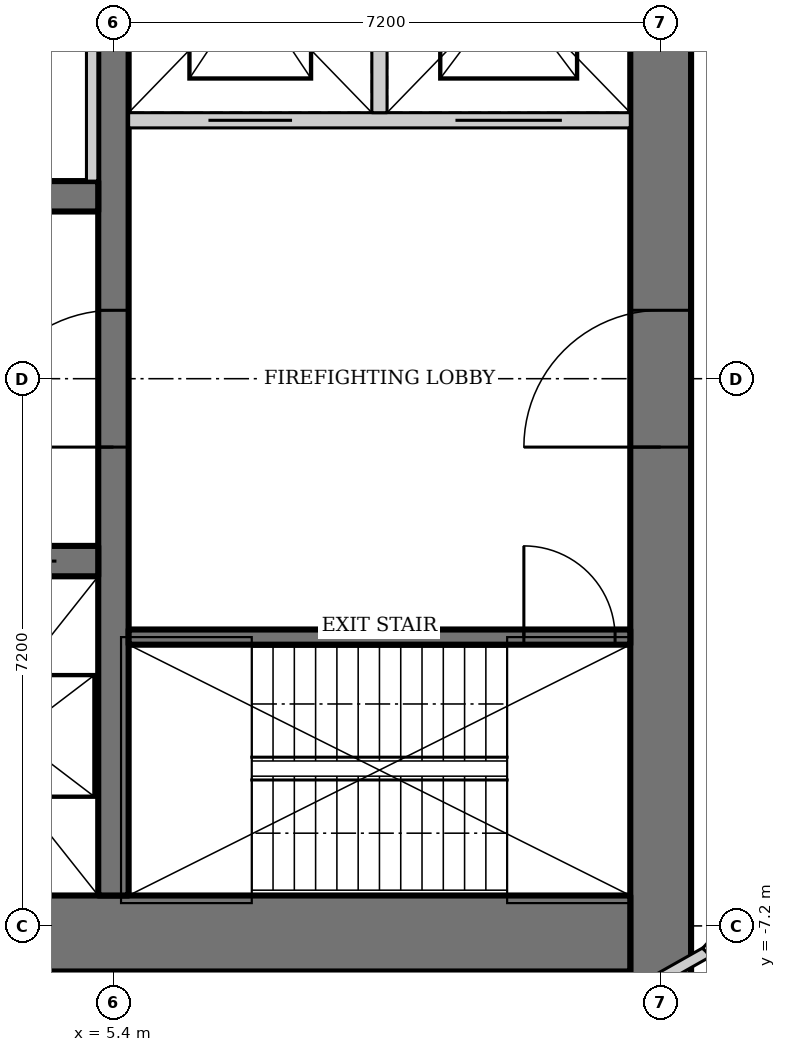
"""IFC4 building model, lengths in metres.
Left out: names, types, materials, properties, quantities, classifications, styles, units other than length and angle.
Written with IfcOpenShell. Run it as: python <this file> out.ifc"""

import sys

from ifc_helpers import new_model, si_unit, direction, frame, frame_2d, origin, place, context, subcontext, project, spatial, rectangle, extrude, element, fill, save


model = new_model("IFC4")
c1 = context("Model", 3, precision=1e-05, world=origin(), true_north=direction((0.0, 1.0)))
c2 = subcontext(c1, "Body", "Model", "MODEL_VIEW")
j1 = project(units=[si_unit("LENGTHUNIT", "METRE"), si_unit("PLANEANGLEUNIT", "RADIAN")], contexts=[c1])
p1 = place(None, origin())
s1 = spatial("IfcSite", under=j1, at=p1, CompositionType="ELEMENT")
p2 = place(p1, origin())
s2 = spatial("IfcBuilding", under=s1, at=p2, CompositionType="ELEMENT")
p3 = place(p2, frame((0.0, 0.0, 270.4)))
s3 = spatial("IfcBuildingStorey", under=s2, at=p3, CompositionType="ELEMENT", Elevation=270.4)
p4 = place(p3, frame((12.6, -11.0, 0.0), z_axis=(0.0, 0.0, 1.0), x_axis=(0.0, 1.0, 0.0)))
e1 = element("IfcWall", 1, at=p4, inside=s3, PredefinedType="SHEAR", context=c2, shape_type="SweptSolid", body=[
    extrude(rectangle(XDim=22.0, YDim=0.8, at=frame_2d((11.0, 0.0))), origin(), (0.0, 0.0, 1.0), 4.5),
])
p5 = place(p4, frame((10.1, 0.0, 0.0)))
e2 = element("IfcOpeningElement", 2, at=p5, cuts=e1, PredefinedType="OPENING", context=c2, shape_type="SweptSolid", body=[
    extrude(rectangle(XDim=1.8, YDim=2.1, at=frame_2d((0.9, 1.05))), frame((0.0, 0.41, 0.0), z_axis=(0.0, -1.0, 0.0), x_axis=(1.0, 0.0, 0.0)), (0.0, 0.0, 1.0), 0.82),
])
p6 = place(p3, frame((-12.2, -7.3, 0.0), z_axis=(0.0, 0.0, 1.0), x_axis=(1.0, 0.0, 0.0)))
e3 = element("IfcWall", 3, at=p6, inside=s3, PredefinedType="SHEAR", context=c2, shape_type="SweptSolid", body=[
    extrude(rectangle(XDim=24.4, YDim=1.0, at=frame_2d((12.2, 0.0))), origin(), (0.0, 0.0, 1.0), 4.5),
])
p7 = place(p3, frame((5.4, -6.8, 0.0), z_axis=(0.0, 0.0, 1.0), x_axis=(0.0, 1.0, 0.0)))
e4 = element("IfcWall", 4, at=p7, inside=s3, PredefinedType="SHEAR", context=c2, shape_type="SweptSolid", body=[
    extrude(rectangle(XDim=14.6, YDim=0.4, at=frame_2d((7.3, 0.0))), origin(), (0.0, 0.0, 1.0), 4.5),
])
p8 = place(p7, frame((5.9, 0.0, 0.0)))
e5 = element("IfcOpeningElement", 5, at=p8, cuts=e4, PredefinedType="OPENING", context=c2, shape_type="SweptSolid", body=[
    extrude(rectangle(XDim=1.8, YDim=2.1, at=frame_2d((0.9, 1.05))), frame((0.0, 0.21, 0.0), z_axis=(0.0, -1.0, 0.0), x_axis=(1.0, 0.0, 0.0)), (0.0, 0.0, 1.0), 0.42),
])
p9 = place(p3, frame((-5.2, -2.4, 0.0), z_axis=(0.0, 0.0, 1.0), x_axis=(1.0, 0.0, 0.0)))
e6 = element("IfcWall", 6, at=p9, inside=s3, PredefinedType="SHEAR", context=c2, shape_type="SweptSolid", body=[
    extrude(rectangle(XDim=10.4, YDim=0.4, at=frame_2d((5.2, 0.0))), origin(), (0.0, 0.0, 1.0), 4.5),
])
p10 = place(p9, frame((1.683, 0.0, 0.0)))
e7 = element("IfcOpeningElement", 7, at=p10, cuts=e6, PredefinedType="OPENING", context=c2, shape_type="SweptSolid", body=[
    extrude(rectangle(XDim=1.1, YDim=2.2, at=frame_2d((0.55, 1.1))), frame((0.0, 0.21, 0.0), z_axis=(0.0, -1.0, 0.0), x_axis=(1.0, 0.0, 0.0)), (0.0, 0.0, 1.0), 0.42),
])
p11 = place(p9, frame((5.217, 0.0, 0.0)))
e8 = element("IfcOpeningElement", 8, at=p11, cuts=e6, PredefinedType="OPENING", context=c2, shape_type="SweptSolid", body=[
    extrude(rectangle(XDim=1.1, YDim=2.2, at=frame_2d((0.55, 1.1))), frame((0.0, 0.21, 0.0), z_axis=(0.0, -1.0, 0.0), x_axis=(1.0, 0.0, 0.0)), (0.0, 0.0, 1.0), 0.42),
])
p12 = place(p9, frame((8.75, 0.0, 0.0)))
e9 = element("IfcOpeningElement", 9, at=p12, cuts=e6, PredefinedType="OPENING", context=c2, shape_type="SweptSolid", body=[
    extrude(rectangle(XDim=1.1, YDim=2.2, at=frame_2d((0.55, 1.1))), frame((0.0, 0.21, 0.0), z_axis=(0.0, -1.0, 0.0), x_axis=(1.0, 0.0, 0.0)), (0.0, 0.0, 1.0), 0.42),
])
p13 = place(p3, frame((5.2, 2.4, 0.0), z_axis=(0.0, 0.0, 1.0), x_axis=(-1.0, 0.0, 0.0)))
e10 = element("IfcWall", 10, at=p13, inside=s3, PredefinedType="SHEAR", context=c2, shape_type="SweptSolid", body=[
    extrude(rectangle(XDim=10.4, YDim=0.4, at=frame_2d((5.2, 0.0))), origin(), (0.0, 0.0, 1.0), 4.5),
])
p14 = place(p3, frame((5.6, -3.4, 0.0), z_axis=(0.0, 0.0, 1.0), x_axis=(1.0, 0.0, 0.0)))
e11 = element("IfcWall", 11, at=p14, inside=s3, PredefinedType="SHEAR", context=c2, shape_type="SweptSolid", body=[
    extrude(rectangle(XDim=6.6, YDim=0.2, at=frame_2d((3.3, 0.0))), origin(), (0.0, 0.0, 1.0), 4.5),
])
p15 = place(p14, frame((5.2, 0.0, 0.0)))
e12 = element("IfcOpeningElement", 12, at=p15, cuts=e11, PredefinedType="OPENING", context=c2, shape_type="SweptSolid", body=[
    extrude(rectangle(XDim=1.2, YDim=2.1, at=frame_2d((0.6, 1.05))), frame((0.0, 0.11, 0.0), z_axis=(0.0, -1.0, 0.0), x_axis=(1.0, 0.0, 0.0)), (0.0, 0.0, 1.0), 0.22),
])
p16 = place(p3, frame((12.2, 3.4, 0.0), z_axis=(0.0, 0.0, 1.0), x_axis=(-1.0, 0.0, 0.0)))
e13 = element("IfcWall", 13, at=p16, inside=s3, PredefinedType="SOLIDWALL", context=c2, shape_type="SweptSolid", body=[
    extrude(rectangle(XDim=6.6, YDim=0.2, at=frame_2d((3.3, 0.0))), origin(), (0.0, 0.0, 1.0), 4.5),
])
p17 = place(p16, frame((4.45, 0.0, 0.0)))
e14 = element("IfcOpeningElement", 14, at=p17, cuts=e13, PredefinedType="OPENING", context=c2, shape_type="SweptSolid", body=[
    extrude(rectangle(XDim=1.1, YDim=2.2, at=frame_2d((0.55, 1.1))), frame((0.0, 0.11, 0.0), z_axis=(0.0, -1.0, 0.0), x_axis=(1.0, 0.0, 0.0)), (0.0, 0.0, 1.0), 0.22),
])
p18 = place(p16, frame((0.9, 0.0, 0.0)))
e15 = element("IfcOpeningElement", 15, at=p18, cuts=e13, PredefinedType="OPENING", context=c2, shape_type="SweptSolid", body=[
    extrude(rectangle(XDim=1.4, YDim=2.2, at=frame_2d((0.7, 1.1))), frame((0.0, 0.11, 0.0), z_axis=(0.0, -1.0, 0.0), x_axis=(1.0, 0.0, 0.0)), (0.0, 0.0, 1.0), 0.22),
])
p19 = place(p3, frame((8.9, 3.5, 0.0), z_axis=(0.0, 0.0, 1.0), x_axis=(0.0, 1.0, 0.0)))
e16 = element("IfcWall", 16, at=p19, inside=s3, PredefinedType="SOLIDWALL", context=c2, shape_type="SweptSolid", body=[
    extrude(rectangle(XDim=3.3, YDim=0.2, at=frame_2d((1.65, 0.0))), origin(), (0.0, 0.0, 1.0), 4.5),
])
p20 = place(p3, frame((19.959, -11.355, 0.0), z_axis=(0.0, 0.0, 1.0), x_axis=(-0.871035125561, 0.491220734537, 0.0)))
e17 = element("IfcWall", 17, at=p20, inside=s3, PredefinedType="PARTITIONING", context=c2, shape_type="SweptSolid", body=[
    extrude(rectangle(XDim=7.753, YDim=0.1, at=frame_2d((3.877, 0.0))), origin(), (0.0, 0.0, 1.0), 3.824),
])
p21 = place(p3, frame((16.362, 4.08, 0.0), z_axis=(0.0, 0.0, 1.0), x_axis=(-0.67323765707, 0.739426167445, 0.0)))
e18 = element("IfcWall", 18, at=p21, inside=s3, PredefinedType="PARTITIONING", context=c2, shape_type="SweptSolid", body=[
    extrude(rectangle(XDim=4.688, YDim=0.15, at=frame_2d((2.344, 0.0))), origin(), (0.0, 0.0, 1.0), 4.35),
])
p22 = place(p21, frame((0.15, 0.0, 0.0)))
e19 = element("IfcOpeningElement", 19, at=p22, cuts=e18, PredefinedType="OPENING", context=c2, shape_type="SweptSolid", body=[
    extrude(rectangle(XDim=0.9, YDim=2.1, at=frame_2d((0.45, 1.05))), frame((0.0, 0.085, 0.0), z_axis=(0.0, -1.0, 0.0), x_axis=(1.0, 0.0, 0.0)), (0.0, 0.0, 1.0), 0.17),
])
p23 = place(p3, frame((9.377, -9.71, 0.0), z_axis=(0.0, 0.0, 1.0), x_axis=(0.870593853694, 0.492002379984, 0.0)))
e20 = element("IfcWall", 20, at=p23, inside=s3, PredefinedType="PARTITIONING", context=c2, shape_type="SweptSolid", body=[
    extrude(rectangle(XDim=4.398, YDim=0.15, at=frame_2d((2.199, 0.0))), origin(), (0.0, 0.0, 1.0), 4.35),
])
p24 = place(p23, frame((0.15, 0.0, 0.0)))
e21 = element("IfcOpeningElement", 21, at=p24, cuts=e20, PredefinedType="OPENING", context=c2, shape_type="SweptSolid", body=[
    extrude(rectangle(XDim=0.9, YDim=2.1, at=frame_2d((0.45, 1.05))), frame((0.0, 0.085, 0.0), z_axis=(0.0, -1.0, 0.0), x_axis=(1.0, 0.0, 0.0)), (0.0, 0.0, 1.0), 0.17),
])
p25 = place(p3, frame((13.206, -7.546, 0.0), z_axis=(0.0, 0.0, 1.0), x_axis=(0.67323765707, 0.739426167445, 0.0)))
e22 = element("IfcWall", 22, at=p25, inside=s3, PredefinedType="PARTITIONING", context=c2, shape_type="SweptSolid", body=[
    extrude(rectangle(XDim=4.688, YDim=0.15, at=frame_2d((2.344, 0.0))), origin(), (0.0, 0.0, 1.0), 4.35),
])
p26 = place(p25, frame((3.638, 0.0, 0.0)))
e23 = element("IfcOpeningElement", 23, at=p26, cuts=e22, PredefinedType="OPENING", context=c2, shape_type="SweptSolid", body=[
    extrude(rectangle(XDim=0.9, YDim=2.1, at=frame_2d((0.45, 1.05))), frame((0.0, 0.085, 0.0), z_axis=(0.0, -1.0, 0.0), x_axis=(1.0, 0.0, 0.0)), (0.0, 0.0, 1.0), 0.17),
])
p27 = place(p3, frame((5.12, 2.6, 0.0), z_axis=(0.0, 0.0, 1.0), x_axis=(0.0, 1.0, 0.0)))
e24 = element("IfcWall", 24, at=p27, inside=s3, PredefinedType="SOLIDWALL", context=c2, shape_type="SweptSolid", body=[
    extrude(rectangle(XDim=4.4, YDim=0.15, at=frame_2d((2.2, 0.0))), origin(), (0.0, 0.0, 1.0), 4.35),
])
p28 = place(p8, origin())
e25 = element("IfcDoor", 25, at=p28, inside=s3, OperationType="DOUBLE_DOOR_DOUBLE_SWING", PredefinedType="DOOR", context=c2, shape_type="SweptSolid", body=[
    extrude(rectangle(XDim=1.8, YDim=2.1, at=frame_2d((0.9, 1.05))), frame((0.0, 0.025, 0.0), z_axis=(0.0, -1.0, 0.0), x_axis=(1.0, 0.0, 0.0)), (0.0, 0.0, 1.0), 0.05),
])
fill(e5, e25)
p29 = place(p15, origin())
e26 = element("IfcDoor", 26, at=p29, inside=s3, OperationType="SINGLE_SWING_RIGHT", PredefinedType="DOOR", context=c2, shape_type="SweptSolid", body=[
    extrude(rectangle(XDim=1.2, YDim=2.1, at=frame_2d((0.6, 1.05))), frame((0.0, 0.025, 0.0), z_axis=(0.0, -1.0, 0.0), x_axis=(1.0, 0.0, 0.0)), (0.0, 0.0, 1.0), 0.05),
])
fill(e12, e26)
p30 = place(p5, origin())
e27 = element("IfcDoor", 27, at=p30, inside=s3, OperationType="DOUBLE_DOOR_DOUBLE_SWING", PredefinedType="DOOR", context=c2, shape_type="SweptSolid", body=[
    extrude(rectangle(XDim=1.8, YDim=2.1, at=frame_2d((0.9, 1.05))), frame((0.0, 0.025, 0.0), z_axis=(0.0, -1.0, 0.0), x_axis=(1.0, 0.0, 0.0)), (0.0, 0.0, 1.0), 0.05),
])
fill(e2, e27)
p31 = place(p12, origin())
e28 = element("IfcDoor", 28, at=p31, inside=s3, OperationType="DOUBLE_DOOR_SLIDING", PredefinedType="DOOR", context=c2, shape_type="SweptSolid", body=[
    extrude(rectangle(XDim=1.1, YDim=2.2, at=frame_2d((0.55, 1.1))), frame((0.0, 0.025, 0.0), z_axis=(0.0, -1.0, 0.0), x_axis=(1.0, 0.0, 0.0)), (0.0, 0.0, 1.0), 0.05),
])
fill(e9, e28)
p32 = place(p17, origin())
e29 = element("IfcDoor", 29, at=p32, inside=s3, OperationType="DOUBLE_DOOR_SLIDING", PredefinedType="DOOR", context=c2, shape_type="SweptSolid", body=[
    extrude(rectangle(XDim=1.1, YDim=2.2, at=frame_2d((0.55, 1.1))), frame((0.0, 0.025, 0.0), z_axis=(0.0, -1.0, 0.0), x_axis=(1.0, 0.0, 0.0)), (0.0, 0.0, 1.0), 0.05),
])
fill(e14, e29)
p33 = place(p18, origin())
e30 = element("IfcDoor", 30, at=p33, inside=s3, OperationType="DOUBLE_DOOR_SLIDING", PredefinedType="DOOR", context=c2, shape_type="SweptSolid", body=[
    extrude(rectangle(XDim=1.4, YDim=2.2, at=frame_2d((0.7, 1.1))), frame((0.0, 0.025, 0.0), z_axis=(0.0, -1.0, 0.0), x_axis=(1.0, 0.0, 0.0)), (0.0, 0.0, 1.0), 0.05),
])
fill(e15, e30)
save(model, sys.argv[1])
